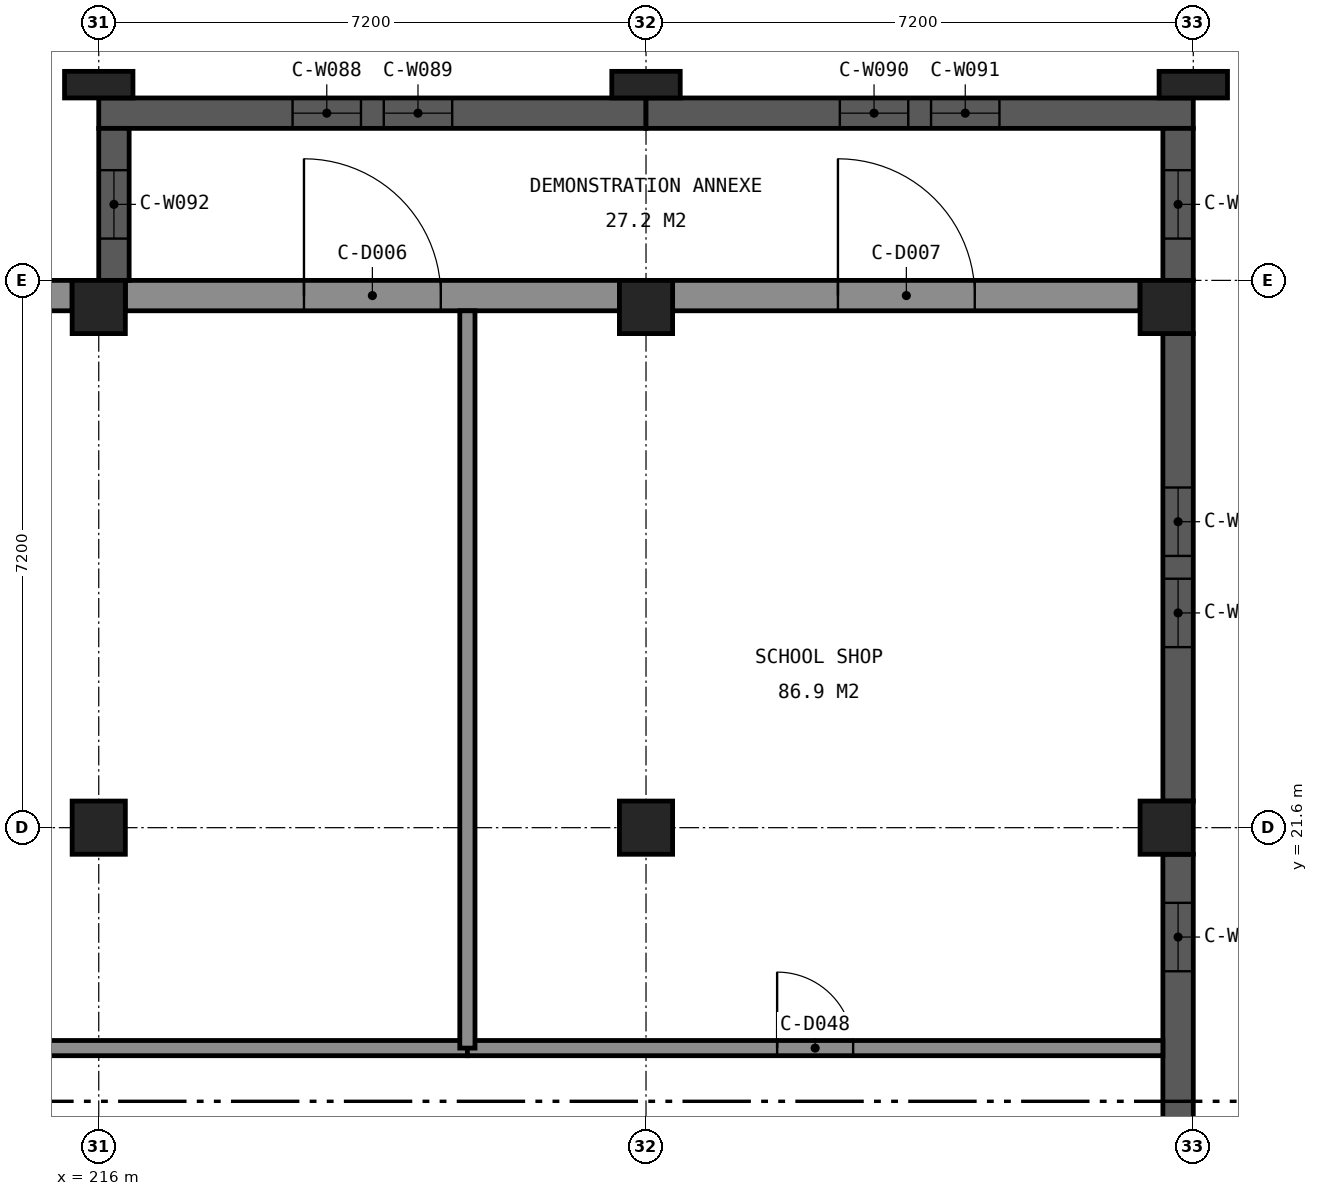
"""IFC4 building model, lengths in metres.
Left out: names, types, materials, properties, quantities, classifications, styles, units other than length and angle.
Written with IfcOpenShell. Run it as: python <this file> out.ifc"""

import sys

from ifc_helpers import new_model, si_unit, direction, frame, frame_2d, origin, origin_2d, place, context, subcontext, project, spatial, rectangle, extrude, element, fill, save


model = new_model("IFC4")
c1 = context("Model", 3, precision=1e-05, world=origin(), true_north=direction((0.0, 1.0)))
c2 = subcontext(c1, "Body", "Model", "MODEL_VIEW")
j1 = project(units=[si_unit("LENGTHUNIT", "METRE"), si_unit("PLANEANGLEUNIT", "RADIAN")], contexts=[c1])
p1 = place(None, origin())
s1 = spatial("IfcSite", under=j1, at=p1, CompositionType="ELEMENT")
p2 = place(p1, origin())
s2 = spatial("IfcBuilding", under=s1, at=p2, CompositionType="ELEMENT")
p3 = place(p2, frame((0.0, 0.0, 4.8)))
s3 = spatial("IfcBuildingStorey", under=s2, at=p3, CompositionType="ELEMENT", Elevation=4.8)
for number, where, z_axis, x_axis in (
    (1, (216.0, 28.45, 0.0), (0.0, 0.0, 1.0), (1.0, 0.0, 0.0)),
    (2, (223.2, 28.45, 0.0), (0.0, 0.0, 1.0), (1.0, 0.0, 0.0)),
    (3, (230.05, 28.45, 0.0), (0.0, 0.0, 1.0), (1.0, 0.0, 0.0)),
    (4, (216.0, 21.6, 0.0), (0.0, 0.0, 1.0), (1.0, 0.0, 0.0)),
    (5, (223.2, 21.6, 0.0), (0.0, 0.0, 1.0), (1.0, 0.0, 0.0)),
    (6, (230.05, 21.6, 0.0), (0.0, 0.0, 1.0), (1.0, 0.0, 0.0)),
):
    element("IfcColumn", number, at=place(p3, frame(where, z_axis=z_axis, x_axis=x_axis)), inside=s3, PredefinedType="COLUMN", context=c2, shape_type="SweptSolid", body=[
        extrude(rectangle(XDim=0.7, YDim=0.7, at=origin_2d()), origin(), (0.0, 0.0, 1.0), 4.8),
    ])
p4 = place(p3, frame((209.15, 28.6, 0.0), z_axis=(0.0, 0.0, 1.0), x_axis=(1.0, 0.0, 0.0)))
e7 = element("IfcWall", 7, at=p4, inside=s3, PredefinedType="SOLIDWALL", context=c2, shape_type="SweptSolid", body=[
    extrude(rectangle(XDim=6.5, YDim=0.4, at=frame_2d((3.25, 0.0))), origin(), (0.0, 0.0, 1.0), 3.95),
])
p5 = place(p4, frame((2.05, 0.0, 0.0)))
e8 = element("IfcOpeningElement", 8, at=p5, cuts=e7, PredefinedType="OPENING", context=c2, shape_type="SweptSolid", body=[
    extrude(rectangle(XDim=2.4, YDim=2.7, at=frame_2d((1.2, 1.35))), frame((0.0, 0.21, 0.0), z_axis=(0.0, -1.0, 0.0), x_axis=(1.0, 0.0, 0.0)), (0.0, 0.0, 1.0), 0.42),
])
p6 = place(p3, frame((216.35, 28.6, 0.0), z_axis=(0.0, 0.0, 1.0), x_axis=(1.0, 0.0, 0.0)))
e9 = element("IfcWall", 9, at=p6, inside=s3, PredefinedType="SOLIDWALL", context=c2, shape_type="SweptSolid", body=[
    extrude(rectangle(XDim=6.5, YDim=0.4, at=frame_2d((3.25, 0.0))), origin(), (0.0, 0.0, 1.0), 3.95),
])
p7 = place(p6, frame((2.35, 0.0, 0.0)))
e10 = element("IfcOpeningElement", 10, at=p7, cuts=e9, PredefinedType="OPENING", context=c2, shape_type="SweptSolid", body=[
    extrude(rectangle(XDim=1.8, YDim=2.1, at=frame_2d((0.9, 1.05))), frame((0.0, 0.21, 0.0), z_axis=(0.0, -1.0, 0.0), x_axis=(1.0, 0.0, 0.0)), (0.0, 0.0, 1.0), 0.42),
])
p8 = place(p3, frame((223.55, 28.6, 0.0), z_axis=(0.0, 0.0, 1.0), x_axis=(1.0, 0.0, 0.0)))
e11 = element("IfcWall", 11, at=p8, inside=s3, PredefinedType="SOLIDWALL", context=c2, shape_type="SweptSolid", body=[
    extrude(rectangle(XDim=6.15, YDim=0.4, at=frame_2d((3.075, 0.0))), origin(), (0.0, 0.0, 1.0), 3.95),
])
p9 = place(p8, frame((2.175, 0.0, 0.0)))
e12 = element("IfcOpeningElement", 12, at=p9, cuts=e11, PredefinedType="OPENING", context=c2, shape_type="SweptSolid", body=[
    extrude(rectangle(XDim=1.8, YDim=2.1, at=frame_2d((0.9, 1.05))), frame((0.0, 0.21, 0.0), z_axis=(0.0, -1.0, 0.0), x_axis=(1.0, 0.0, 0.0)), (0.0, 0.0, 1.0), 0.42),
])
p10 = place(p3, frame((230.2, 28.1, 0.0), z_axis=(0.0, 0.0, 1.0), x_axis=(0.0, -1.0, 0.0)))
e13 = element("IfcWall", 13, at=p10, inside=s3, PredefinedType="SHEAR", context=c2, shape_type="SweptSolid", body=[
    extrude(rectangle(XDim=6.15, YDim=0.4, at=frame_2d((3.075, 0.0))), origin(), (0.0, 0.0, 1.0), 3.95),
])
p11 = place(p10, frame((2.025, 0.0, 1.0)))
e14 = element("IfcOpeningElement", 14, at=p11, cuts=e13, PredefinedType="OPENING", context=c2, shape_type="SweptSolid", body=[
    extrude(rectangle(XDim=0.9, YDim=2.1, at=frame_2d((0.45, 1.05))), frame((0.0, 0.21, 0.0), z_axis=(0.0, -1.0, 0.0), x_axis=(1.0, 0.0, 0.0)), (0.0, 0.0, 1.0), 0.42),
])
p12 = place(p10, frame((3.225, 0.0, 1.0)))
e15 = element("IfcOpeningElement", 15, at=p12, cuts=e13, PredefinedType="OPENING", context=c2, shape_type="SweptSolid", body=[
    extrude(rectangle(XDim=0.9, YDim=2.1, at=frame_2d((0.45, 1.05))), frame((0.0, 0.21, 0.0), z_axis=(0.0, -1.0, 0.0), x_axis=(1.0, 0.0, 0.0)), (0.0, 0.0, 1.0), 0.42),
])
p13 = place(p3, frame((230.2, 21.25, 0.0), z_axis=(0.0, 0.0, 1.0), x_axis=(0.0, -1.0, 0.0)))
e16 = element("IfcWall", 16, at=p13, inside=s3, PredefinedType="SHEAR", context=c2, shape_type="SweptSolid", body=[
    extrude(rectangle(XDim=6.05, YDim=0.4, at=frame_2d((3.025, 0.0))), origin(), (0.0, 0.0, 1.0), 3.95),
])
p14 = place(p13, frame((3.6, 0.0, 0.0)))
e17 = element("IfcOpeningElement", 17, at=p14, cuts=e16, PredefinedType="OPENING", context=c2, shape_type="SweptSolid", body=[
    extrude(rectangle(XDim=1.1, YDim=2.1, at=frame_2d((0.55, 1.05))), frame((0.0, 0.21, 0.0), z_axis=(0.0, -1.0, 0.0), x_axis=(1.0, 0.0, 0.0)), (0.0, 0.0, 1.0), 0.42),
])
p15 = place(p13, frame((0.639, 0.0, 1.0)))
e18 = element("IfcOpeningElement", 18, at=p15, cuts=e16, PredefinedType="OPENING", context=c2, shape_type="SweptSolid", body=[
    extrude(rectangle(XDim=0.9, YDim=2.1, at=frame_2d((0.45, 1.05))), frame((0.0, 0.21, 0.0), z_axis=(0.0, -1.0, 0.0), x_axis=(1.0, 0.0, 0.0)), (0.0, 0.0, 1.0), 0.42),
])
p16 = place(p3, frame((216.0, 31.0, 0.0), z_axis=(0.0, 0.0, 1.0), x_axis=(1.0, 0.0, 0.0)))
e19 = element("IfcWall", 19, at=p16, inside=s3, PredefinedType="SOLIDWALL", context=c2, shape_type="SweptSolid", body=[
    extrude(rectangle(XDim=7.2, YDim=0.4, at=frame_2d((3.6, 0.0))), origin(), (0.0, 0.0, 1.0), 4.55),
])
p17 = place(p16, frame((2.55, 0.0, 1.0)))
e20 = element("IfcOpeningElement", 20, at=p17, cuts=e19, PredefinedType="OPENING", context=c2, shape_type="SweptSolid", body=[
    extrude(rectangle(XDim=0.9, YDim=2.1, at=frame_2d((0.45, 1.05))), frame((0.0, 0.21, 0.0), z_axis=(0.0, -1.0, 0.0), x_axis=(1.0, 0.0, 0.0)), (0.0, 0.0, 1.0), 0.42),
])
p18 = place(p16, frame((3.75, 0.0, 1.0)))
e21 = element("IfcOpeningElement", 21, at=p18, cuts=e19, PredefinedType="OPENING", context=c2, shape_type="SweptSolid", body=[
    extrude(rectangle(XDim=0.9, YDim=2.1, at=frame_2d((0.45, 1.05))), frame((0.0, 0.21, 0.0), z_axis=(0.0, -1.0, 0.0), x_axis=(1.0, 0.0, 0.0)), (0.0, 0.0, 1.0), 0.42),
])
p19 = place(p3, frame((223.2, 31.0, 0.0), z_axis=(0.0, 0.0, 1.0), x_axis=(1.0, 0.0, 0.0)))
e22 = element("IfcWall", 22, at=p19, inside=s3, PredefinedType="SOLIDWALL", context=c2, shape_type="SweptSolid", body=[
    extrude(rectangle(XDim=7.2, YDim=0.4, at=frame_2d((3.6, 0.0))), origin(), (0.0, 0.0, 1.0), 4.55),
])
p20 = place(p19, frame((2.55, 0.0, 1.0)))
e23 = element("IfcOpeningElement", 23, at=p20, cuts=e22, PredefinedType="OPENING", context=c2, shape_type="SweptSolid", body=[
    extrude(rectangle(XDim=0.9, YDim=2.1, at=frame_2d((0.45, 1.05))), frame((0.0, 0.21, 0.0), z_axis=(0.0, -1.0, 0.0), x_axis=(1.0, 0.0, 0.0)), (0.0, 0.0, 1.0), 0.42),
])
p21 = place(p19, frame((3.75, 0.0, 1.0)))
e24 = element("IfcOpeningElement", 24, at=p21, cuts=e22, PredefinedType="OPENING", context=c2, shape_type="SweptSolid", body=[
    extrude(rectangle(XDim=0.9, YDim=2.1, at=frame_2d((0.45, 1.05))), frame((0.0, 0.21, 0.0), z_axis=(0.0, -1.0, 0.0), x_axis=(1.0, 0.0, 0.0)), (0.0, 0.0, 1.0), 0.42),
])
p22 = place(p3, frame((216.2, 28.8, 0.0), z_axis=(0.0, 0.0, 1.0), x_axis=(0.0, 1.0, 0.0)))
e25 = element("IfcWall", 25, at=p22, inside=s3, PredefinedType="SOLIDWALL", context=c2, shape_type="SweptSolid", body=[
    extrude(rectangle(XDim=2.0, YDim=0.4, at=frame_2d((1.0, 0.0))), origin(), (0.0, 0.0, 1.0), 4.55),
])
p23 = place(p22, frame((0.55, 0.0, 1.0)))
e26 = element("IfcOpeningElement", 26, at=p23, cuts=e25, PredefinedType="OPENING", context=c2, shape_type="SweptSolid", body=[
    extrude(rectangle(XDim=0.9, YDim=2.1, at=frame_2d((0.45, 1.05))), frame((0.0, 0.21, 0.0), z_axis=(0.0, -1.0, 0.0), x_axis=(1.0, 0.0, 0.0)), (0.0, 0.0, 1.0), 0.42),
])
p24 = place(p3, frame((230.2, 30.8, 0.0), z_axis=(0.0, 0.0, 1.0), x_axis=(0.0, -1.0, 0.0)))
e27 = element("IfcWall", 27, at=p24, inside=s3, PredefinedType="SOLIDWALL", context=c2, shape_type="SweptSolid", body=[
    extrude(rectangle(XDim=2.0, YDim=0.4, at=frame_2d((1.0, 0.0))), origin(), (0.0, 0.0, 1.0), 4.55),
])
p25 = place(p24, frame((0.55, 0.0, 1.0)))
e28 = element("IfcOpeningElement", 28, at=p25, cuts=e27, PredefinedType="OPENING", context=c2, shape_type="SweptSolid", body=[
    extrude(rectangle(XDim=0.9, YDim=2.1, at=frame_2d((0.45, 1.05))), frame((0.0, 0.21, 0.0), z_axis=(0.0, -1.0, 0.0), x_axis=(1.0, 0.0, 0.0)), (0.0, 0.0, 1.0), 0.42),
])
for number, where, z_axis, x_axis in (
    (29, (216.0, 31.375, 0.0), (0.0, 0.0, 1.0), (1.0, 0.0, 0.0)),
    (30, (223.2, 31.375, 0.0), (0.0, 0.0, 1.0), (1.0, 0.0, 0.0)),
    (31, (230.4, 31.375, 0.0), (0.0, 0.0, 1.0), (1.0, 0.0, 0.0)),
):
    element("IfcColumn", number, at=place(p3, frame(where, z_axis=z_axis, x_axis=x_axis)), inside=s3, PredefinedType="PILASTER", context=c2, shape_type="SweptSolid", body=[
        extrude(rectangle(XDim=0.9, YDim=0.35, at=origin_2d()), origin(), (0.0, 0.0, 1.0), 4.8),
    ])
p26 = place(p3, frame((205.6, 18.7, 0.0), z_axis=(0.0, 0.0, 1.0), x_axis=(1.0, 0.0, 0.0)))
e32 = element("IfcWall", 32, at=p26, inside=s3, PredefinedType="PARTITIONING", context=c2, shape_type="SweptSolid", body=[
    extrude(rectangle(XDim=15.25, YDim=0.2, at=frame_2d((7.625, 0.0))), origin(), (0.0, 0.0, 1.0), 3.95),
])
p27 = place(p26, frame((7.125, 0.0, 0.0)))
e33 = element("IfcOpeningElement", 33, at=p27, cuts=e32, PredefinedType="OPENING", context=c2, shape_type="SweptSolid", body=[
    extrude(rectangle(XDim=1.0, YDim=2.1, at=frame_2d((0.5, 1.05))), frame((0.0, 0.11, 0.0), z_axis=(0.0, -1.0, 0.0), x_axis=(1.0, 0.0, 0.0)), (0.0, 0.0, 1.0), 0.22),
])
p28 = place(p3, frame((220.85, 18.7, 0.0), z_axis=(0.0, 0.0, 1.0), x_axis=(1.0, 0.0, 0.0)))
e34 = element("IfcWall", 34, at=p28, inside=s3, PredefinedType="PARTITIONING", context=c2, shape_type="SweptSolid", body=[
    extrude(rectangle(XDim=9.15, YDim=0.2, at=frame_2d((4.575, 0.0))), origin(), (0.0, 0.0, 1.0), 3.95),
])
p29 = place(p28, frame((4.075, 0.0, 0.0)))
e35 = element("IfcOpeningElement", 35, at=p29, cuts=e34, PredefinedType="OPENING", context=c2, shape_type="SweptSolid", body=[
    extrude(rectangle(XDim=1.0, YDim=2.1, at=frame_2d((0.5, 1.05))), frame((0.0, 0.11, 0.0), z_axis=(0.0, -1.0, 0.0), x_axis=(1.0, 0.0, 0.0)), (0.0, 0.0, 1.0), 0.22),
])
p30 = place(p3, frame((220.85, 28.4, 0.0), z_axis=(0.0, 0.0, 1.0), x_axis=(0.0, -1.0, 0.0)))
e36 = element("IfcWall", 36, at=p30, inside=s3, PredefinedType="PARTITIONING", context=c2, shape_type="SweptSolid", body=[
    extrude(rectangle(XDim=9.7, YDim=0.2, at=frame_2d((4.85, 0.0))), origin(), (0.0, 0.0, 1.0), 3.95),
])
p31 = place(p7, origin())
e37 = element("IfcDoor", 37, at=p31, inside=s3, OperationType="NOTDEFINED", PredefinedType="DOOR", context=c2, shape_type="SweptSolid", body=[
    extrude(rectangle(XDim=1.8, YDim=2.1, at=frame_2d((0.9, 1.05))), frame((0.0, 0.025, 0.0), z_axis=(0.0, -1.0, 0.0), x_axis=(1.0, 0.0, 0.0)), (0.0, 0.0, 1.0), 0.05),
])
fill(e10, e37)
p32 = place(p9, origin())
e38 = element("IfcDoor", 38, at=p32, inside=s3, OperationType="NOTDEFINED", PredefinedType="DOOR", context=c2, shape_type="SweptSolid", body=[
    extrude(rectangle(XDim=1.8, YDim=2.1, at=frame_2d((0.9, 1.05))), frame((0.0, 0.025, 0.0), z_axis=(0.0, -1.0, 0.0), x_axis=(1.0, 0.0, 0.0)), (0.0, 0.0, 1.0), 0.05),
])
fill(e12, e38)
p33 = place(p11, origin())
e39 = element("IfcWindow", 39, at=p33, inside=s3, PartitioningType="SINGLE_PANEL", PredefinedType="WINDOW", context=c2, shape_type="SweptSolid", body=[
    extrude(rectangle(XDim=0.9, YDim=2.1, at=frame_2d((0.45, 1.05))), frame((0.0, -0.09, 0.0), z_axis=(0.0, -1.0, 0.0), x_axis=(1.0, 0.0, 0.0)), (0.0, 0.0, 1.0), 0.06),
])
fill(e14, e39)
p34 = place(p12, origin())
e40 = element("IfcWindow", 40, at=p34, inside=s3, PartitioningType="SINGLE_PANEL", PredefinedType="WINDOW", context=c2, shape_type="SweptSolid", body=[
    extrude(rectangle(XDim=0.9, YDim=2.1, at=frame_2d((0.45, 1.05))), frame((0.0, -0.09, 0.0), z_axis=(0.0, -1.0, 0.0), x_axis=(1.0, 0.0, 0.0)), (0.0, 0.0, 1.0), 0.06),
])
fill(e15, e40)
p35 = place(p15, origin())
e41 = element("IfcWindow", 41, at=p35, inside=s3, PartitioningType="SINGLE_PANEL", PredefinedType="WINDOW", context=c2, shape_type="SweptSolid", body=[
    extrude(rectangle(XDim=0.9, YDim=2.1, at=frame_2d((0.45, 1.05))), frame((0.0, -0.09, 0.0), z_axis=(0.0, -1.0, 0.0), x_axis=(1.0, 0.0, 0.0)), (0.0, 0.0, 1.0), 0.06),
])
fill(e18, e41)
p36 = place(p17, origin())
e42 = element("IfcWindow", 42, at=p36, inside=s3, PartitioningType="SINGLE_PANEL", PredefinedType="WINDOW", context=c2, shape_type="SweptSolid", body=[
    extrude(rectangle(XDim=0.9, YDim=2.1, at=frame_2d((0.45, 1.05))), frame((0.0, -0.09, 0.0), z_axis=(0.0, -1.0, 0.0), x_axis=(1.0, 0.0, 0.0)), (0.0, 0.0, 1.0), 0.06),
])
fill(e20, e42)
p37 = place(p18, origin())
e43 = element("IfcWindow", 43, at=p37, inside=s3, PartitioningType="SINGLE_PANEL", PredefinedType="WINDOW", context=c2, shape_type="SweptSolid", body=[
    extrude(rectangle(XDim=0.9, YDim=2.1, at=frame_2d((0.45, 1.05))), frame((0.0, -0.09, 0.0), z_axis=(0.0, -1.0, 0.0), x_axis=(1.0, 0.0, 0.0)), (0.0, 0.0, 1.0), 0.06),
])
fill(e21, e43)
p38 = place(p20, origin())
e44 = element("IfcWindow", 44, at=p38, inside=s3, PartitioningType="SINGLE_PANEL", PredefinedType="WINDOW", context=c2, shape_type="SweptSolid", body=[
    extrude(rectangle(XDim=0.9, YDim=2.1, at=frame_2d((0.45, 1.05))), frame((0.0, -0.09, 0.0), z_axis=(0.0, -1.0, 0.0), x_axis=(1.0, 0.0, 0.0)), (0.0, 0.0, 1.0), 0.06),
])
fill(e23, e44)
p39 = place(p21, origin())
e45 = element("IfcWindow", 45, at=p39, inside=s3, PartitioningType="SINGLE_PANEL", PredefinedType="WINDOW", context=c2, shape_type="SweptSolid", body=[
    extrude(rectangle(XDim=0.9, YDim=2.1, at=frame_2d((0.45, 1.05))), frame((0.0, -0.09, 0.0), z_axis=(0.0, -1.0, 0.0), x_axis=(1.0, 0.0, 0.0)), (0.0, 0.0, 1.0), 0.06),
])
fill(e24, e45)
p40 = place(p23, origin())
e46 = element("IfcWindow", 46, at=p40, inside=s3, PartitioningType="SINGLE_PANEL", PredefinedType="WINDOW", context=c2, shape_type="SweptSolid", body=[
    extrude(rectangle(XDim=0.9, YDim=2.1, at=frame_2d((0.45, 1.05))), frame((0.0, -0.09, 0.0), z_axis=(0.0, -1.0, 0.0), x_axis=(1.0, 0.0, 0.0)), (0.0, 0.0, 1.0), 0.06),
])
fill(e26, e46)
p41 = place(p25, origin())
e47 = element("IfcWindow", 47, at=p41, inside=s3, PartitioningType="SINGLE_PANEL", PredefinedType="WINDOW", context=c2, shape_type="SweptSolid", body=[
    extrude(rectangle(XDim=0.9, YDim=2.1, at=frame_2d((0.45, 1.05))), frame((0.0, -0.09, 0.0), z_axis=(0.0, -1.0, 0.0), x_axis=(1.0, 0.0, 0.0)), (0.0, 0.0, 1.0), 0.06),
])
fill(e28, e47)
p42 = place(p29, origin())
e48 = element("IfcDoor", 48, at=p42, inside=s3, OperationType="NOTDEFINED", PredefinedType="DOOR", context=c2, shape_type="SweptSolid", body=[
    extrude(rectangle(XDim=1.0, YDim=2.1, at=frame_2d((0.5, 1.05))), frame((0.0, 0.025, 0.0), z_axis=(0.0, -1.0, 0.0), x_axis=(1.0, 0.0, 0.0)), (0.0, 0.0, 1.0), 0.05),
])
fill(e35, e48)
save(model, sys.argv[1])
